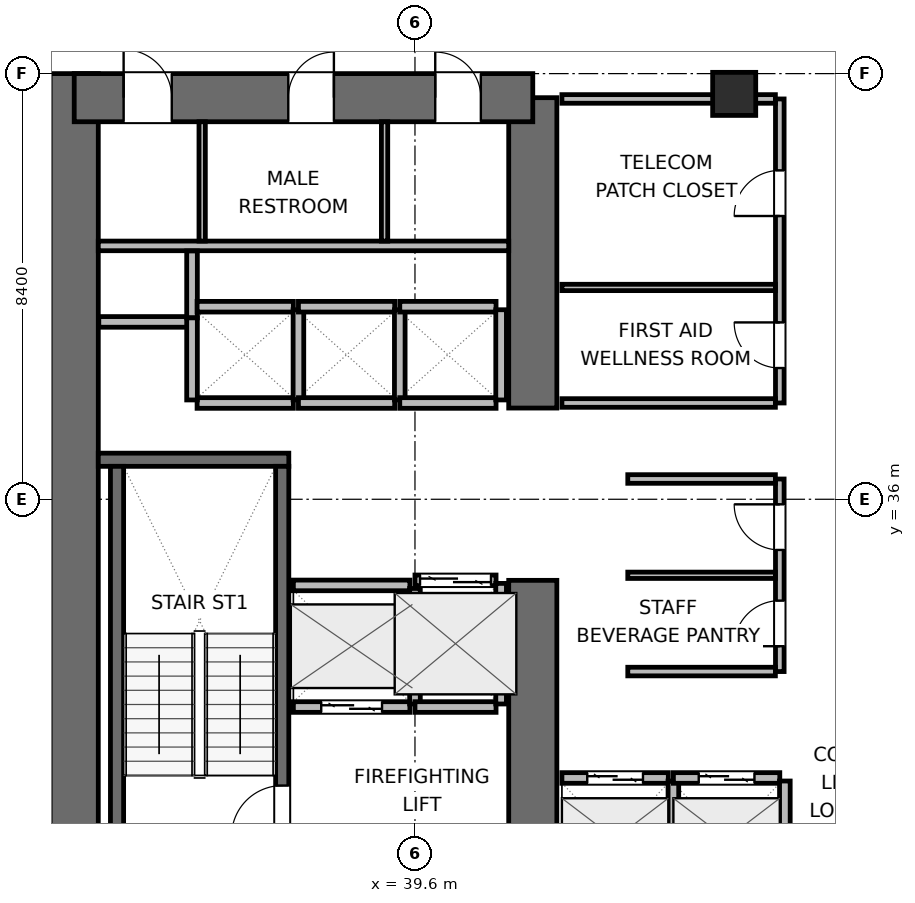
"""IFC4 building model, lengths in metres.
Left out: names, types, materials, properties, quantities, classifications, styles, units other than length and angle.
Written with IfcOpenShell. Run it as: python <this file> out.ifc"""

import sys

from ifc_helpers import new_model, si_unit, direction, frame, frame_2d, origin, origin_2d, place, context, subcontext, project, spatial, rectangle, extrude, element, fill, save


model = new_model("IFC4")
c1 = context("Model", 3, precision=1e-05, world=origin(), true_north=direction((0.0, 1.0)))
c2 = subcontext(c1, "Body", "Model", "MODEL_VIEW")
j1 = project(units=[si_unit("LENGTHUNIT", "METRE"), si_unit("PLANEANGLEUNIT", "RADIAN")], contexts=[c1])
p1 = place(None, origin())
s1 = spatial("IfcSite", under=j1, at=p1, CompositionType="ELEMENT")
p2 = place(p1, origin())
s2 = spatial("IfcBuilding", under=s1, at=p2, CompositionType="ELEMENT")
p3 = place(p2, frame((0.0, 0.0, 60.6)))
s3 = spatial("IfcBuildingStorey", under=s2, at=p3, CompositionType="ELEMENT", Elevation=60.6)
p4 = place(p3, frame((32.875, 27.6, 0.0), z_axis=(0.0, 0.0, 1.0), x_axis=(0.0, 1.0, 0.0)))
e1 = element("IfcWall", 1, at=p4, inside=s3, PredefinedType="SHEAR", context=c2, shape_type="SweptSolid", body=[
    extrude(rectangle(XDim=16.8, YDim=0.95, at=frame_2d((8.4, 0.0))), origin(), (0.0, 0.0, 1.0), 3.9),
])
p5 = place(p3, frame((41.925, 28.075, 0.0), z_axis=(0.0, 0.0, 1.0), x_axis=(0.0, 1.0, 0.0)))
e2 = element("IfcWall", 2, at=p5, inside=s3, PredefinedType="SHEAR", context=c2, shape_type="SweptSolid", body=[
    extrude(rectangle(XDim=6.325, YDim=0.95, at=frame_2d((3.163, 0.0))), origin(), (0.0, 0.0, 1.0), 3.9),
])
p6 = place(p3, frame((41.925, 37.8, 0.0), z_axis=(0.0, 0.0, 1.0), x_axis=(0.0, 1.0, 0.0)))
e3 = element("IfcWall", 3, at=p6, inside=s3, PredefinedType="SHEAR", context=c2, shape_type="SweptSolid", body=[
    extrude(rectangle(XDim=6.125, YDim=0.95, at=frame_2d((3.062, 0.0))), origin(), (0.0, 0.0, 1.0), 3.9),
])
p7 = place(p3, frame((32.875, 43.925, 0.0), z_axis=(0.0, 0.0, 1.0), x_axis=(1.0, 0.0, 0.0)))
e4 = element("IfcWall", 4, at=p7, inside=s3, PredefinedType="SHEAR", context=c2, shape_type="SweptSolid", body=[
    extrude(rectangle(XDim=9.05, YDim=0.95, at=frame_2d((4.525, 0.0))), origin(), (0.0, 0.0, 1.0), 3.9),
])
p8 = place(p7, frame((0.975, 0.0, 0.0)))
e5 = element("IfcOpeningElement", 5, at=p8, cuts=e4, PredefinedType="OPENING", context=c2, shape_type="SweptSolid", body=[
    extrude(rectangle(XDim=0.95, YDim=2.04, at=frame_2d((0.475, 1.02))), frame((0.0, 0.485, 0.0), z_axis=(0.0, -1.0, 0.0), x_axis=(1.0, 0.0, 0.0)), (0.0, 0.0, 1.0), 0.97),
])
p9 = place(p7, frame((4.225, 0.0, 0.0)))
e6 = element("IfcOpeningElement", 6, at=p9, cuts=e4, PredefinedType="OPENING", context=c2, shape_type="SweptSolid", body=[
    extrude(rectangle(XDim=0.9, YDim=2.02, at=frame_2d((0.45, 1.01))), frame((0.0, 0.485, 0.0), z_axis=(0.0, -1.0, 0.0), x_axis=(1.0, 0.0, 0.0)), (0.0, 0.0, 1.0), 0.97),
])
p10 = place(p7, frame((7.125, 0.0, 0.0)))
e7 = element("IfcOpeningElement", 7, at=p10, cuts=e4, PredefinedType="OPENING", context=c2, shape_type="SweptSolid", body=[
    extrude(rectangle(XDim=0.9, YDim=2.02, at=frame_2d((0.45, 1.01))), frame((0.0, 0.485, 0.0), z_axis=(0.0, -1.0, 0.0), x_axis=(1.0, 0.0, 0.0)), (0.0, 0.0, 1.0), 0.97),
])
p11 = place(p3, frame((33.35, 36.78, 0.0), z_axis=(0.0, 0.0, 1.0), x_axis=(1.0, 0.0, 0.0)))
e8 = element("IfcWall", 8, at=p11, inside=s3, PredefinedType="SHEAR", context=c2, shape_type="SweptSolid", body=[
    extrude(rectangle(XDim=3.76, YDim=0.26, at=frame_2d((1.88, 0.0))), origin(), (0.0, 0.0, 1.0), 3.9),
])
p12 = place(p3, frame((33.72, 29.05, 0.0), z_axis=(0.0, 0.0, 1.0), x_axis=(0.0, 1.0, 0.0)))
e9 = element("IfcWall", 9, at=p12, inside=s3, PredefinedType="SHEAR", context=c2, shape_type="SweptSolid", body=[
    extrude(rectangle(XDim=7.6, YDim=0.26, at=frame_2d((3.8, 0.0))), origin(), (0.0, 0.0, 1.0), 3.9),
])
p13 = place(p3, frame((36.98, 29.05, 0.0), z_axis=(0.0, 0.0, 1.0), x_axis=(0.0, 1.0, 0.0)))
e10 = element("IfcWall", 10, at=p13, inside=s3, PredefinedType="SHEAR", context=c2, shape_type="SweptSolid", body=[
    extrude(rectangle(XDim=7.6, YDim=0.26, at=frame_2d((3.8, 0.0))), origin(), (0.0, 0.0, 1.0), 3.9),
])
p14 = place(p13, frame((0.3, 0.0, 0.0)))
e11 = element("IfcOpeningElement", 11, at=p14, cuts=e10, PredefinedType="OPENING", context=c2, shape_type="SweptSolid", body=[
    extrude(rectangle(XDim=1.0, YDim=2.04, at=frame_2d((0.5, 1.02))), frame((0.0, 0.14, 0.0), z_axis=(0.0, -1.0, 0.0), x_axis=(1.0, 0.0, 0.0)), (0.0, 0.0, 1.0), 0.28),
])
p15 = place(p3, frame((45.9, 44.0, 0.0), z_axis=(0.0, 0.0, 1.0), x_axis=(1.0, 0.0, 0.0)))
e12 = element("IfcColumn", 12, at=p15, inside=s3, PredefinedType="COLUMN", context=c2, shape_type="SweptSolid", body=[
    extrude(rectangle(XDim=0.85, YDim=0.85, at=origin_2d()), origin(), (0.0, 0.0, 1.0), 3.9),
])
p16 = place(p3, frame((33.35, 41.0, 0.0), z_axis=(0.0, 0.0, 1.0), x_axis=(1.0, 0.0, 0.0)))
e13 = element("IfcWall", 13, at=p16, inside=s3, PredefinedType="PLUMBINGWALL", context=c2, shape_type="SweptSolid", body=[
    extrude(rectangle(XDim=8.1, YDim=0.19, at=frame_2d((4.05, 0.0))), origin(), (0.0, 0.0, 1.0), 3.64),
])
for number, where, z_axis, x_axis in (
    (14, (35.4, 41.095, 0.0), (0.0, 0.0, 1.0), (0.0, 1.0, 0.0)),
    (15, (39.0, 41.095, 0.0), (0.0, 0.0, 1.0), (0.0, 1.0, 0.0)),
):
    element("IfcWall", number, at=place(p3, frame(where, z_axis=z_axis, x_axis=x_axis)), inside=s3, PredefinedType="PARTITIONING", context=c2, shape_type="SweptSolid", body=[
        extrude(rectangle(XDim=2.355, YDim=0.125, at=frame_2d((1.177, 0.0))), origin(), (0.0, 0.0, 1.0), 3.64),
    ])
p17 = place(p3, frame((33.36, 39.5, 0.0), z_axis=(0.0, 0.0, 1.0), x_axis=(1.0, 0.0, 0.0)))
e16 = element("IfcWall", 16, at=p17, inside=s3, PredefinedType="PARTITIONING", context=c2, shape_type="SweptSolid", body=[
    extrude(rectangle(XDim=1.86, YDim=0.21, at=frame_2d((0.93, 0.0))), origin(), (0.0, 0.0, 1.0), 3.64),
])
p18 = place(p3, frame((35.2, 39.58, 0.0), z_axis=(0.0, 0.0, 1.0), x_axis=(0.0, 1.0, 0.0)))
e17 = element("IfcWall", 17, at=p18, inside=s3, PredefinedType="PARTITIONING", context=c2, shape_type="SweptSolid", body=[
    extrude(rectangle(XDim=1.32, YDim=0.21, at=frame_2d((0.66, 0.0))), origin(), (0.0, 0.0, 1.0), 3.64),
])
p19 = place(p3, frame((37.2, 31.9, 0.0), z_axis=(0.0, 0.0, 1.0), x_axis=(1.0, 0.0, 0.0)))
e18 = element("IfcWall", 18, at=p19, inside=s3, PredefinedType="PARTITIONING", context=c2, shape_type="SweptSolid", body=[
    extrude(rectangle(XDim=2.3, YDim=0.21, at=frame_2d((1.15, 0.0))), origin(), (0.0, 0.0, 1.0), 3.64),
])
p20 = place(p19, frame((0.55, 0.0, 0.0)))
e19 = element("IfcOpeningElement", 19, at=p20, cuts=e18, PredefinedType="OPENING", context=c2, shape_type="SweptSolid", body=[
    extrude(rectangle(XDim=1.2, YDim=2.04, at=frame_2d((0.6, 1.02))), frame((0.0, 0.115, 0.0), z_axis=(0.0, -1.0, 0.0), x_axis=(1.0, 0.0, 0.0)), (0.0, 0.0, 1.0), 0.23),
])
p21 = place(p3, frame((37.2, 34.3, 0.0), z_axis=(0.0, 0.0, 1.0), x_axis=(1.0, 0.0, 0.0)))
e20 = element("IfcWall", 20, at=p21, inside=s3, PredefinedType="PARTITIONING", context=c2, shape_type="SweptSolid", body=[
    extrude(rectangle(XDim=2.3, YDim=0.21, at=frame_2d((1.15, 0.0))), origin(), (0.0, 0.0, 1.0), 3.64),
])
p22 = place(p3, frame((39.6, 31.96, 0.0), z_axis=(0.0, 0.0, 1.0), x_axis=(0.0, 1.0, 0.0)))
e21 = element("IfcWall", 21, at=p22, inside=s3, PredefinedType="PARTITIONING", context=c2, shape_type="SweptSolid", body=[
    extrude(rectangle(XDim=2.28, YDim=0.21, at=frame_2d((1.14, 0.0))), origin(), (0.0, 0.0, 1.0), 3.64),
])
p23 = place(p3, frame((39.6, 34.4, 0.0), z_axis=(0.0, 0.0, 1.0), x_axis=(1.0, 0.0, 0.0)))
e22 = element("IfcWall", 22, at=p23, inside=s3, PredefinedType="PARTITIONING", context=c2, shape_type="SweptSolid", body=[
    extrude(rectangle(XDim=1.6, YDim=0.21, at=frame_2d((0.8, 0.0))), origin(), (0.0, 0.0, 1.0), 3.64),
])
p24 = place(p23, frame((0.1, 0.0, 0.0)))
e23 = element("IfcOpeningElement", 23, at=p24, cuts=e22, PredefinedType="OPENING", context=c2, shape_type="SweptSolid", body=[
    extrude(rectangle(XDim=1.4, YDim=2.06, at=frame_2d((0.7, 1.03))), frame((0.0, 0.115, 0.0), z_axis=(0.0, -1.0, 0.0), x_axis=(1.0, 0.0, 0.0)), (0.0, 0.0, 1.0), 0.23),
])
p25 = place(p3, frame((39.6, 31.9, 0.0), z_axis=(0.0, 0.0, 1.0), x_axis=(1.0, 0.0, 0.0)))
e24 = element("IfcWall", 24, at=p25, inside=s3, PredefinedType="PARTITIONING", context=c2, shape_type="SweptSolid", body=[
    extrude(rectangle(XDim=1.6, YDim=0.21, at=frame_2d((0.8, 0.0))), origin(), (0.0, 0.0, 1.0), 3.64),
])
p26 = place(p3, frame((41.3, 31.96, 0.0), z_axis=(0.0, 0.0, 1.0), x_axis=(0.0, 1.0, 0.0)))
e25 = element("IfcWall", 25, at=p26, inside=s3, PredefinedType="PARTITIONING", context=c2, shape_type="SweptSolid", body=[
    extrude(rectangle(XDim=2.38, YDim=0.21, at=frame_2d((1.19, 0.0))), origin(), (0.0, 0.0, 1.0), 3.64),
])
p27 = place(p3, frame((42.5, 30.5, 0.0), z_axis=(0.0, 0.0, 1.0), x_axis=(1.0, 0.0, 0.0)))
e26 = element("IfcWall", 26, at=p27, inside=s3, PredefinedType="PARTITIONING", context=c2, shape_type="SweptSolid", body=[
    extrude(rectangle(XDim=2.1, YDim=0.21, at=frame_2d((1.05, 0.0))), origin(), (0.0, 0.0, 1.0), 3.64),
])
p28 = place(p27, frame((0.5, 0.0, 0.0)))
e27 = element("IfcOpeningElement", 27, at=p28, cuts=e26, PredefinedType="OPENING", context=c2, shape_type="SweptSolid", body=[
    extrude(rectangle(XDim=1.1, YDim=2.04, at=frame_2d((0.55, 1.02))), frame((0.0, 0.115, 0.0), z_axis=(0.0, -1.0, 0.0), x_axis=(1.0, 0.0, 0.0)), (0.0, 0.0, 1.0), 0.23),
])
p29 = place(p3, frame((44.7, 28.16, 0.0), z_axis=(0.0, 0.0, 1.0), x_axis=(0.0, 1.0, 0.0)))
e28 = element("IfcWall", 28, at=p29, inside=s3, PredefinedType="PARTITIONING", context=c2, shape_type="SweptSolid", body=[
    extrude(rectangle(XDim=2.28, YDim=0.21, at=frame_2d((1.14, 0.0))), origin(), (0.0, 0.0, 1.0), 3.64),
])
p30 = place(p3, frame((44.7, 30.5, 0.0), z_axis=(0.0, 0.0, 1.0), x_axis=(1.0, 0.0, 0.0)))
e29 = element("IfcWall", 29, at=p30, inside=s3, PredefinedType="PARTITIONING", context=c2, shape_type="SweptSolid", body=[
    extrude(rectangle(XDim=2.1, YDim=0.21, at=frame_2d((1.05, 0.0))), origin(), (0.0, 0.0, 1.0), 3.64),
])
p31 = place(p30, frame((0.5, 0.0, 0.0)))
e30 = element("IfcOpeningElement", 30, at=p31, cuts=e29, PredefinedType="OPENING", context=c2, shape_type="SweptSolid", body=[
    extrude(rectangle(XDim=1.1, YDim=2.04, at=frame_2d((0.55, 1.02))), frame((0.0, 0.115, 0.0), z_axis=(0.0, -1.0, 0.0), x_axis=(1.0, 0.0, 0.0)), (0.0, 0.0, 1.0), 0.23),
])
p32 = place(p3, frame((46.9, 28.16, 0.0), z_axis=(0.0, 0.0, 1.0), x_axis=(0.0, 1.0, 0.0)))
e31 = element("IfcWall", 31, at=p32, inside=s3, PredefinedType="PARTITIONING", context=c2, shape_type="SweptSolid", body=[
    extrude(rectangle(XDim=2.28, YDim=0.21, at=frame_2d((1.14, 0.0))), origin(), (0.0, 0.0, 1.0), 3.64),
])
for number, where, z_axis, x_axis in (
    (32, (35.3, 37.9, 0.0), (0.0, 0.0, 1.0), (1.0, 0.0, 0.0)),
    (33, (35.3, 39.8, 0.0), (0.0, 0.0, 1.0), (1.0, 0.0, 0.0)),
):
    element("IfcWall", number, at=place(p3, frame(where, z_axis=z_axis, x_axis=x_axis)), inside=s3, PredefinedType="PARTITIONING", context=c2, shape_type="SweptSolid", body=[
        extrude(rectangle(XDim=1.9, YDim=0.21, at=frame_2d((0.95, 0.0))), origin(), (0.0, 0.0, 1.0), 3.64),
    ])
p33 = place(p3, frame((35.2, 37.96, 0.0), z_axis=(0.0, 0.0, 1.0), x_axis=(0.0, 1.0, 0.0)))
e34 = element("IfcWall", 34, at=p33, inside=s3, PredefinedType="PARTITIONING", context=c2, shape_type="SweptSolid", body=[
    extrude(rectangle(XDim=1.62, YDim=0.21, at=frame_2d((0.81, 0.0))), origin(), (0.0, 0.0, 1.0), 3.64),
])
p34 = place(p3, frame((37.3, 37.96, 0.0), z_axis=(0.0, 0.0, 1.0), x_axis=(0.0, 1.0, 0.0)))
e35 = element("IfcWall", 35, at=p34, inside=s3, PredefinedType="PARTITIONING", context=c2, shape_type="SweptSolid", body=[
    extrude(rectangle(XDim=1.78, YDim=0.21, at=frame_2d((0.89, 0.0))), origin(), (0.0, 0.0, 1.0), 3.64),
])
for number, where, z_axis, x_axis in (
    (36, (37.3, 37.9, 0.0), (0.0, 0.0, 1.0), (1.0, 0.0, 0.0)),
    (37, (37.3, 39.8, 0.0), (0.0, 0.0, 1.0), (1.0, 0.0, 0.0)),
):
    element("IfcWall", number, at=place(p3, frame(where, z_axis=z_axis, x_axis=x_axis)), inside=s3, PredefinedType="PARTITIONING", context=c2, shape_type="SweptSolid", body=[
        extrude(rectangle(XDim=1.9, YDim=0.21, at=frame_2d((0.95, 0.0))), origin(), (0.0, 0.0, 1.0), 3.64),
    ])
p35 = place(p3, frame((39.3, 37.96, 0.0), z_axis=(0.0, 0.0, 1.0), x_axis=(0.0, 1.0, 0.0)))
e38 = element("IfcWall", 38, at=p35, inside=s3, PredefinedType="PARTITIONING", context=c2, shape_type="SweptSolid", body=[
    extrude(rectangle(XDim=1.78, YDim=0.21, at=frame_2d((0.89, 0.0))), origin(), (0.0, 0.0, 1.0), 3.64),
])
for number, where, z_axis, x_axis in (
    (39, (39.3, 37.9, 0.0), (0.0, 0.0, 1.0), (1.0, 0.0, 0.0)),
    (40, (39.3, 39.8, 0.0), (0.0, 0.0, 1.0), (1.0, 0.0, 0.0)),
):
    element("IfcWall", number, at=place(p3, frame(where, z_axis=z_axis, x_axis=x_axis)), inside=s3, PredefinedType="PARTITIONING", context=c2, shape_type="SweptSolid", body=[
        extrude(rectangle(XDim=1.9, YDim=0.21, at=frame_2d((0.95, 0.0))), origin(), (0.0, 0.0, 1.0), 3.64),
    ])
p36 = place(p3, frame((41.3, 37.96, 0.0), z_axis=(0.0, 0.0, 1.0), x_axis=(0.0, 1.0, 0.0)))
e41 = element("IfcWall", 41, at=p36, inside=s3, PredefinedType="PARTITIONING", context=c2, shape_type="SweptSolid", body=[
    extrude(rectangle(XDim=1.78, YDim=0.21, at=frame_2d((0.89, 0.0))), origin(), (0.0, 0.0, 1.0), 3.64),
])
p37 = place(p3, frame((46.8, 32.6, 0.0), z_axis=(0.0, 0.0, 1.0), x_axis=(0.0, 1.0, 0.0)))
e42 = element("IfcWall", 42, at=p37, inside=s3, PredefinedType="PARTITIONING", context=c2, shape_type="SweptSolid", body=[
    extrude(rectangle(XDim=3.8, YDim=0.17, at=frame_2d((1.9, 0.0))), origin(), (0.0, 0.0, 1.0), 3.64),
])
p38 = place(p37, frame((0.5, 0.0, 0.0)))
e43 = element("IfcOpeningElement", 43, at=p38, cuts=e42, PredefinedType="OPENING", context=c2, shape_type="SweptSolid", body=[
    extrude(rectangle(XDim=0.9, YDim=2.02, at=frame_2d((0.45, 1.01))), frame((0.0, 0.095, 0.0), z_axis=(0.0, -1.0, 0.0), x_axis=(1.0, 0.0, 0.0)), (0.0, 0.0, 1.0), 0.19),
])
p39 = place(p37, frame((2.4, 0.0, 0.0)))
e44 = element("IfcOpeningElement", 44, at=p39, cuts=e42, PredefinedType="OPENING", context=c2, shape_type="SweptSolid", body=[
    extrude(rectangle(XDim=0.9, YDim=2.02, at=frame_2d((0.45, 1.01))), frame((0.0, 0.095, 0.0), z_axis=(0.0, -1.0, 0.0), x_axis=(1.0, 0.0, 0.0)), (0.0, 0.0, 1.0), 0.19),
])
for number, where, z_axis, x_axis in (
    (45, (43.8, 32.6, 0.0), (0.0, 0.0, 1.0), (1.0, 0.0, 0.0)),
    (46, (43.8, 36.4, 0.0), (0.0, 0.0, 1.0), (1.0, 0.0, 0.0)),
):
    element("IfcWall", number, at=place(p3, frame(where, z_axis=z_axis, x_axis=x_axis)), inside=s3, PredefinedType="PARTITIONING", context=c2, shape_type="SweptSolid", body=[
        extrude(rectangle(XDim=2.913, YDim=0.17, at=frame_2d((1.457, 0.0))), origin(), (0.0, 0.0, 1.0), 3.64),
    ])
p40 = place(p3, frame((43.8, 34.5, 0.0), z_axis=(0.0, 0.0, 1.0), x_axis=(1.0, 0.0, 0.0)))
e47 = element("IfcWall", 47, at=p40, inside=s3, PredefinedType="PARTITIONING", context=c2, shape_type="SweptSolid", body=[
    extrude(rectangle(XDim=2.913, YDim=0.125, at=frame_2d((1.457, 0.0))), origin(), (0.0, 0.0, 1.0), 3.64),
])
p41 = place(p3, frame((46.8, 37.9, 0.0), z_axis=(0.0, 0.0, 1.0), x_axis=(0.0, 1.0, 0.0)))
e48 = element("IfcWall", 48, at=p41, inside=s3, PredefinedType="PARTITIONING", context=c2, shape_type="SweptSolid", body=[
    extrude(rectangle(XDim=6.0, YDim=0.17, at=frame_2d((3.0, 0.0))), origin(), (0.0, 0.0, 1.0), 3.64),
])
p42 = place(p41, frame((0.69, 0.0, 0.0)))
e49 = element("IfcOpeningElement", 49, at=p42, cuts=e48, PredefinedType="OPENING", context=c2, shape_type="SweptSolid", body=[
    extrude(rectangle(XDim=0.9, YDim=2.02, at=frame_2d((0.45, 1.01))), frame((0.0, 0.095, 0.0), z_axis=(0.0, -1.0, 0.0), x_axis=(1.0, 0.0, 0.0)), (0.0, 0.0, 1.0), 0.19),
])
p43 = place(p41, frame((3.69, 0.0, 0.0)))
e50 = element("IfcOpeningElement", 50, at=p43, cuts=e48, PredefinedType="OPENING", context=c2, shape_type="SweptSolid", body=[
    extrude(rectangle(XDim=0.9, YDim=2.02, at=frame_2d((0.45, 1.01))), frame((0.0, 0.095, 0.0), z_axis=(0.0, -1.0, 0.0), x_axis=(1.0, 0.0, 0.0)), (0.0, 0.0, 1.0), 0.19),
])
p44 = place(p3, frame((42.5, 37.9, 0.0), z_axis=(0.0, 0.0, 1.0), x_axis=(1.0, 0.0, 0.0)))
e51 = element("IfcWall", 51, at=p44, inside=s3, PredefinedType="PARTITIONING", context=c2, shape_type="SweptSolid", body=[
    extrude(rectangle(XDim=4.213, YDim=0.17, at=frame_2d((2.106, 0.0))), origin(), (0.0, 0.0, 1.0), 3.64),
])
p45 = place(p3, frame((42.5, 43.9, 0.0), z_axis=(0.0, 0.0, 1.0), x_axis=(1.0, 0.0, 0.0)))
e52 = element("IfcWall", 52, at=p45, inside=s3, PredefinedType="PARTITIONING", context=c2, shape_type="SweptSolid", body=[
    extrude(rectangle(XDim=4.213, YDim=0.17, at=frame_2d((2.106, 0.0))), origin(), (0.0, 0.0, 1.0), 2.525),
])
p46 = place(p3, frame((42.5, 40.18, 0.0), z_axis=(0.0, 0.0, 1.0), x_axis=(1.0, 0.0, 0.0)))
e53 = element("IfcWall", 53, at=p46, inside=s3, PredefinedType="PARTITIONING", context=c2, shape_type="SweptSolid", body=[
    extrude(rectangle(XDim=4.213, YDim=0.125, at=frame_2d((2.106, 0.0))), origin(), (0.0, 0.0, 1.0), 3.64),
])
p47 = place(p14, origin())
e54 = element("IfcDoor", 54, at=p47, inside=s3, OperationType="SINGLE_SWING_LEFT", PredefinedType="DOOR", context=c2, shape_type="SweptSolid", body=[
    extrude(rectangle(XDim=1.0, YDim=2.04, at=frame_2d((0.5, 1.02))), frame((0.0, 0.025, 0.0), z_axis=(0.0, -1.0, 0.0), x_axis=(1.0, 0.0, 0.0)), (0.0, 0.0, 1.0), 0.05),
])
fill(e11, e54)
p48 = place(p20, origin())
e55 = element("IfcDoor", 55, at=p48, inside=s3, OperationType="DOUBLE_DOOR_SLIDING", PredefinedType="DOOR", context=c2, shape_type="SweptSolid", body=[
    extrude(rectangle(XDim=1.2, YDim=2.04, at=frame_2d((0.6, 1.02))), frame((0.0, 0.025, 0.0), z_axis=(0.0, -1.0, 0.0), x_axis=(1.0, 0.0, 0.0)), (0.0, 0.0, 1.0), 0.05),
])
fill(e19, e55)
p49 = place(p24, origin())
e56 = element("IfcDoor", 56, at=p49, inside=s3, OperationType="DOUBLE_DOOR_SLIDING", PredefinedType="DOOR", context=c2, shape_type="SweptSolid", body=[
    extrude(rectangle(XDim=1.4, YDim=2.06, at=frame_2d((0.7, 1.03))), frame((0.0, 0.025, 0.0), z_axis=(0.0, -1.0, 0.0), x_axis=(1.0, 0.0, 0.0)), (0.0, 0.0, 1.0), 0.05),
])
fill(e23, e56)
p50 = place(p28, origin())
e57 = element("IfcDoor", 57, at=p50, inside=s3, OperationType="DOUBLE_DOOR_SLIDING", PredefinedType="DOOR", context=c2, shape_type="SweptSolid", body=[
    extrude(rectangle(XDim=1.1, YDim=2.04, at=frame_2d((0.55, 1.02))), frame((0.0, 0.025, 0.0), z_axis=(0.0, -1.0, 0.0), x_axis=(1.0, 0.0, 0.0)), (0.0, 0.0, 1.0), 0.05),
])
fill(e27, e57)
p51 = place(p31, origin())
e58 = element("IfcDoor", 58, at=p51, inside=s3, OperationType="DOUBLE_DOOR_SLIDING", PredefinedType="DOOR", context=c2, shape_type="SweptSolid", body=[
    extrude(rectangle(XDim=1.1, YDim=2.04, at=frame_2d((0.55, 1.02))), frame((0.0, 0.025, 0.0), z_axis=(0.0, -1.0, 0.0), x_axis=(1.0, 0.0, 0.0)), (0.0, 0.0, 1.0), 0.05),
])
fill(e30, e58)
p52 = place(p8, origin())
e59 = element("IfcDoor", 59, at=p52, inside=s3, OperationType="SINGLE_SWING_LEFT", PredefinedType="DOOR", context=c2, shape_type="SweptSolid", body=[
    extrude(rectangle(XDim=0.95, YDim=2.04, at=frame_2d((0.475, 1.02))), frame((0.0, 0.025, 0.0), z_axis=(0.0, -1.0, 0.0), x_axis=(1.0, 0.0, 0.0)), (0.0, 0.0, 1.0), 0.05),
])
fill(e5, e59)
p53 = place(p9, origin())
e60 = element("IfcDoor", 60, at=p53, inside=s3, OperationType="SINGLE_SWING_RIGHT", PredefinedType="DOOR", context=c2, shape_type="SweptSolid", body=[
    extrude(rectangle(XDim=0.9, YDim=2.02, at=frame_2d((0.45, 1.01))), frame((0.0, 0.025, 0.0), z_axis=(0.0, -1.0, 0.0), x_axis=(1.0, 0.0, 0.0)), (0.0, 0.0, 1.0), 0.05),
])
fill(e6, e60)
p54 = place(p10, origin())
e61 = element("IfcDoor", 61, at=p54, inside=s3, OperationType="SINGLE_SWING_LEFT", PredefinedType="DOOR", context=c2, shape_type="SweptSolid", body=[
    extrude(rectangle(XDim=0.9, YDim=2.02, at=frame_2d((0.45, 1.01))), frame((0.0, 0.025, 0.0), z_axis=(0.0, -1.0, 0.0), x_axis=(1.0, 0.0, 0.0)), (0.0, 0.0, 1.0), 0.05),
])
fill(e7, e61)
p55 = place(p38, origin())
e62 = element("IfcDoor", 62, at=p55, inside=s3, OperationType="SINGLE_SWING_LEFT", PredefinedType="DOOR", context=c2, shape_type="SweptSolid", body=[
    extrude(rectangle(XDim=0.9, YDim=2.02, at=frame_2d((0.45, 1.01))), frame((0.0, 0.025, 0.0), z_axis=(0.0, -1.0, 0.0), x_axis=(1.0, 0.0, 0.0)), (0.0, 0.0, 1.0), 0.05),
])
fill(e43, e62)
p56 = place(p39, origin())
e63 = element("IfcDoor", 63, at=p56, inside=s3, OperationType="SINGLE_SWING_RIGHT", PredefinedType="DOOR", context=c2, shape_type="SweptSolid", body=[
    extrude(rectangle(XDim=0.9, YDim=2.02, at=frame_2d((0.45, 1.01))), frame((0.0, 0.025, 0.0), z_axis=(0.0, -1.0, 0.0), x_axis=(1.0, 0.0, 0.0)), (0.0, 0.0, 1.0), 0.05),
])
fill(e44, e63)
p57 = place(p42, origin())
e64 = element("IfcDoor", 64, at=p57, inside=s3, OperationType="SINGLE_SWING_RIGHT", PredefinedType="DOOR", context=c2, shape_type="SweptSolid", body=[
    extrude(rectangle(XDim=0.9, YDim=2.02, at=frame_2d((0.45, 1.01))), frame((0.0, 0.025, 0.0), z_axis=(0.0, -1.0, 0.0), x_axis=(1.0, 0.0, 0.0)), (0.0, 0.0, 1.0), 0.05),
])
fill(e49, e64)
p58 = place(p43, origin())
e65 = element("IfcDoor", 65, at=p58, inside=s3, OperationType="SINGLE_SWING_LEFT", PredefinedType="DOOR", context=c2, shape_type="SweptSolid", body=[
    extrude(rectangle(XDim=0.9, YDim=2.02, at=frame_2d((0.45, 1.01))), frame((0.0, 0.025, 0.0), z_axis=(0.0, -1.0, 0.0), x_axis=(1.0, 0.0, 0.0)), (0.0, 0.0, 1.0), 0.05),
])
fill(e50, e65)
save(model, sys.argv[1])
